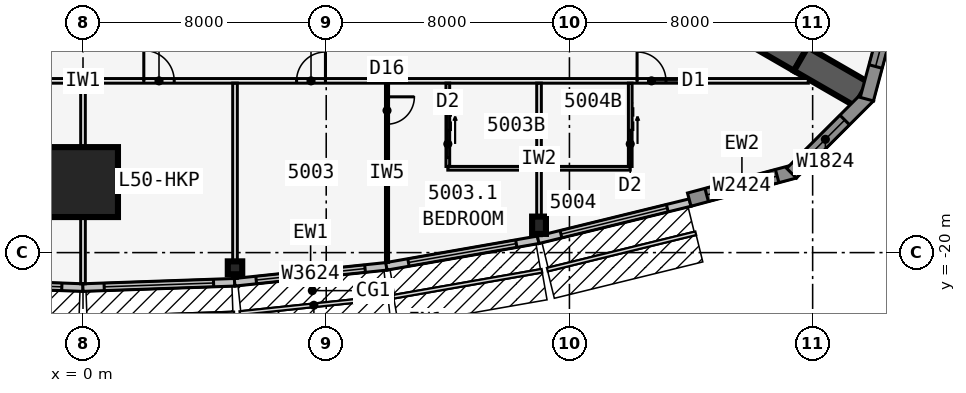
"""IFC4 building model, lengths in metres.
Left out: names, types, materials, properties, quantities, classifications, styles, units other than length and angle.
Written with IfcOpenShell. Run it as: python <this file> out.ifc"""

import sys

from ifc_helpers import new_model, si_unit, direction, frame, frame_2d, origin, origin_2d, place, context, subcontext, project, spatial, polyline, rectangle, i_section, outline, extrude, element, fill, save


model = new_model("IFC4")
c1 = context("Model", 3, precision=1e-05, world=origin(), true_north=direction((0.0, 1.0)))
c2 = subcontext(c1, "Body", "Model", "MODEL_VIEW")
j1 = project(units=[si_unit("LENGTHUNIT", "METRE"), si_unit("PLANEANGLEUNIT", "RADIAN")], contexts=[c1])
p1 = place(None, origin())
s1 = spatial("IfcSite", under=j1, at=p1, CompositionType="ELEMENT")
p2 = place(p1, origin())
s2 = spatial("IfcBuilding", under=s1, at=p2, CompositionType="ELEMENT")
p3 = place(p2, frame((0.0, 0.0, 186.1)))
s3 = spatial("IfcBuildingStorey", under=s2, at=p3, CompositionType="ELEMENT", Elevation=186.1)
for number, where, z_axis, x_axis in (
    (1, (21.61, -12.477, 0.0), (0.0, 0.0, 1.0), (0.866, -0.5, 0.0)),
    (2, (23.61, -13.631, 0.0), (0.0, 0.0, 1.0), (0.866, -0.5, 0.0)),
):
    element("IfcWall", number, at=place(p3, frame(where, z_axis=z_axis, x_axis=x_axis)), inside=s3, PredefinedType="SHEAR", context=c2, shape_type="SweptSolid", body=[
        extrude(rectangle(XDim=2.309, YDim=0.9, at=frame_2d((1.155, 0.0))), origin(), (0.0, 0.0, 1.0), 3.4),
    ])
p4 = place(p3, frame((5.0, -20.5, 0.0), z_axis=(0.0, 0.0, 1.0), x_axis=(0.0, -1.0, 0.0)))
e3 = element("IfcColumn", 3, at=p4, inside=s3, PredefinedType="COLUMN", context=c2, shape_type="SweptSolid", body=[
    extrude(i_section(OverallWidth=0.424, OverallDepth=0.475, WebThickness=0.048, FlangeThickness=0.077, at=origin_2d()), origin(), (0.0, 0.0, 1.0), 3.4),
])
p5 = place(p3, frame((15.0, -19.1, 0.0), z_axis=(0.0, 0.0, 1.0), x_axis=(1.0, 0.0, 0.0)))
e4 = element("IfcColumn", 4, at=p5, inside=s3, PredefinedType="COLUMN", context=c2, shape_type="SweptSolid", body=[
    extrude(i_section(OverallWidth=0.455, OverallDepth=0.569, WebThickness=0.078, FlangeThickness=0.125, at=origin_2d()), origin(), (0.0, 0.0, 1.0), 3.4),
])
p6 = place(p3, frame((0.0, -17.68, 0.0), z_axis=(0.0, 0.0, 1.0), x_axis=(0.0, -1.0, 0.0)))
e5 = element("IfcColumn", 5, at=p6, inside=s3, PredefinedType="COLUMN", context=c2, shape_type="SweptSolid", body=[
    extrude(rectangle(XDim=2.3, YDim=2.3, at=origin_2d()), origin(), (0.0, 0.0, 1.0), 3.4),
])
p7 = place(p3, frame((-4.996, -20.975, 0.0), z_axis=(0.0, 0.0, 1.0), x_axis=(0.999387720943, -0.034988329879, 0.0)))
e6 = element("IfcWall", 6, at=p7, inside=s3, PredefinedType="STANDARD", context=c2, shape_type="SweptSolid", body=[
    extrude(rectangle(XDim=5.003, YDim=0.25, at=frame_2d((2.501, 0.0))), origin(), (0.0, 0.0, 1.0), 3.15),
])
p8 = place(p7, frame((0.701, 0.0, 0.45)))
e7 = element("IfcOpeningElement", 7, at=p8, cuts=e6, PredefinedType="OPENING", context=c2, shape_type="SweptSolid", body=[
    extrude(rectangle(XDim=3.6, YDim=2.4, at=frame_2d((1.8, 1.2))), frame((0.0, 0.135, 0.0), z_axis=(0.0, -1.0, 0.0), x_axis=(1.0, 0.0, 0.0)), (0.0, 0.0, 1.0), 0.27),
])
p9 = place(p3, frame((-0.004, -21.15, 0.0), z_axis=(0.0, 0.0, 1.0), x_axis=(0.999387720943, 0.034988329879, 0.0)))
e8 = element("IfcWall", 8, at=p9, inside=s3, PredefinedType="STANDARD", context=c2, shape_type="SweptSolid", body=[
    extrude(rectangle(XDim=5.003, YDim=0.25, at=frame_2d((2.501, 0.0))), origin(), (0.0, 0.0, 1.0), 3.15),
])
p10 = place(p9, frame((0.701, 0.0, 0.45)))
e9 = element("IfcOpeningElement", 9, at=p10, cuts=e8, PredefinedType="OPENING", context=c2, shape_type="SweptSolid", body=[
    extrude(rectangle(XDim=3.6, YDim=2.4, at=frame_2d((1.8, 1.2))), frame((0.0, 0.135, 0.0), z_axis=(0.0, -1.0, 0.0), x_axis=(1.0, 0.0, 0.0)), (0.0, 0.0, 1.0), 0.27),
])
p11 = place(p3, frame((4.987, -20.976, 0.0), z_axis=(0.0, 0.0, 1.0), x_axis=(0.994534683851, 0.104406717299, 0.0)))
e10 = element("IfcWall", 10, at=p11, inside=s3, PredefinedType="STANDARD", context=c2, shape_type="SweptSolid", body=[
    extrude(rectangle(XDim=5.028, YDim=0.25, at=frame_2d((2.514, 0.0))), origin(), (0.0, 0.0, 1.0), 3.15),
])
p12 = place(p11, frame((0.714, 0.0, 0.45)))
e11 = element("IfcOpeningElement", 11, at=p12, cuts=e10, PredefinedType="OPENING", context=c2, shape_type="SweptSolid", body=[
    extrude(rectangle(XDim=3.6, YDim=2.4, at=frame_2d((1.8, 1.2))), frame((0.0, 0.135, 0.0), z_axis=(0.0, -1.0, 0.0), x_axis=(1.0, 0.0, 0.0)), (0.0, 0.0, 1.0), 0.27),
])
p13 = place(p3, frame((9.979, -20.452, 0.0), z_axis=(0.0, 0.0, 1.0), x_axis=(0.985030467156, 0.172380331752, 0.0)))
e12 = element("IfcWall", 12, at=p13, inside=s3, PredefinedType="STANDARD", context=c2, shape_type="SweptSolid", body=[
    extrude(rectangle(XDim=5.076, YDim=0.25, at=frame_2d((2.538, 0.0))), origin(), (0.0, 0.0, 1.0), 3.15),
])
p14 = place(p13, frame((0.738, 0.0, 0.45)))
e13 = element("IfcOpeningElement", 13, at=p14, cuts=e12, PredefinedType="OPENING", context=c2, shape_type="SweptSolid", body=[
    extrude(rectangle(XDim=3.6, YDim=2.4, at=frame_2d((1.8, 1.2))), frame((0.0, 0.135, 0.0), z_axis=(0.0, -1.0, 0.0), x_axis=(1.0, 0.0, 0.0)), (0.0, 0.0, 1.0), 0.27),
])
p15 = place(p3, frame((14.97, -19.579, 0.0), z_axis=(0.0, 0.0, 1.0), x_axis=(0.971270024053, 0.237980126011, 0.0)))
e14 = element("IfcWall", 14, at=p15, inside=s3, PredefinedType="STANDARD", context=c2, shape_type="SweptSolid", body=[
    extrude(rectangle(XDim=5.148, YDim=0.25, at=frame_2d((2.574, 0.0))), origin(), (0.0, 0.0, 1.0), 3.15),
])
p16 = place(p15, frame((0.774, 0.0, 0.45)))
e15 = element("IfcOpeningElement", 15, at=p16, cuts=e14, PredefinedType="OPENING", context=c2, shape_type="SweptSolid", body=[
    extrude(rectangle(XDim=3.6, YDim=2.4, at=frame_2d((1.8, 1.2))), frame((0.0, 0.135, 0.0), z_axis=(0.0, -1.0, 0.0), x_axis=(1.0, 0.0, 0.0)), (0.0, 0.0, 1.0), 0.27),
])
p17 = place(p3, frame((19.942, -18.258, 0.0), z_axis=(0.0, 0.0, 1.0), x_axis=(0.965924653531, 0.258823421857, 0.0)))
e16 = element("IfcWall", 16, at=p17, inside=s3, PredefinedType="SOLIDWALL", context=c2, shape_type="SweptSolid", body=[
    extrude(rectangle(XDim=3.586, YDim=0.45, at=frame_2d((1.793, 0.0))), origin(), (0.0, 0.0, 1.0), 3.15),
])
p18 = place(p17, frame((0.593, 0.0, 0.45)))
e17 = element("IfcOpeningElement", 17, at=p18, cuts=e16, PredefinedType="OPENING", context=c2, shape_type="SweptSolid", body=[
    extrude(rectangle(XDim=2.4, YDim=2.4, at=frame_2d((1.2, 1.2))), frame((0.0, 0.235, 0.0), z_axis=(0.0, -1.0, 0.0), x_axis=(1.0, 0.0, 0.0)), (0.0, 0.0, 1.0), 0.47),
])
p19 = place(p3, frame((23.305, -17.388, 0.0), z_axis=(0.0, 0.0, 1.0), x_axis=(0.707106781187, 0.707106781187, 0.0)))
e18 = element("IfcWall", 18, at=p19, inside=s3, PredefinedType="SOLIDWALL", context=c2, shape_type="SweptSolid", body=[
    extrude(outline(polyline([(3.586, 0.225), (3.527, 0.225), (3.035, 0.093), (3.0, 0.225), (0.0, 0.225), (0.0, -0.225), (3.586, -0.225), (3.586, 0.225)])), origin(), (0.0, 0.0, 1.0), 3.15),
])
p20 = place(p19, frame((0.675, 0.0, 0.45)))
e19 = element("IfcOpeningElement", 19, at=p20, cuts=e18, PredefinedType="OPENING", context=c2, shape_type="SweptSolid", body=[
    extrude(rectangle(XDim=1.8, YDim=2.4, at=frame_2d((0.9, 1.2))), frame((0.0, 0.235, 0.0), z_axis=(0.0, -1.0, 0.0), x_axis=(1.0, 0.0, 0.0)), (0.0, 0.0, 1.0), 0.47),
])
p21 = place(p3, frame((25.783, -14.953, 0.0), z_axis=(0.0, 0.0, 1.0), x_axis=(0.258823421857, 0.965924653531, 0.0)))
e20 = element("IfcWall", 20, at=p21, inside=s3, PredefinedType="SOLIDWALL", context=c2, shape_type="SweptSolid", body=[
    extrude(outline(polyline([(3.586, 0.225), (0.586, 0.225), (0.551, 0.093), (0.06, 0.225), (0.0, 0.225), (0.0, -0.225), (3.586, -0.225), (3.586, 0.225)])), origin(), (0.0, 0.0, 1.0), 3.15),
])
p22 = place(p21, frame((1.111, 0.0, 0.45)))
e21 = element("IfcOpeningElement", 21, at=p22, cuts=e20, PredefinedType="OPENING", context=c2, shape_type="SweptSolid", body=[
    extrude(rectangle(XDim=1.8, YDim=2.4, at=frame_2d((0.9, 1.2))), frame((0.0, 0.235, 0.0), z_axis=(0.0, -1.0, 0.0), x_axis=(1.0, 0.0, 0.0)), (0.0, 0.0, 1.0), 0.47),
])
p23 = place(p3, frame((-23.857, -14.351, 0.0), z_axis=(0.0, 0.0, 1.0), x_axis=(1.0, 0.0, 0.0)))
e22 = element("IfcWall", 22, at=p23, inside=s3, PredefinedType="PARTITIONING", context=c2, shape_type="SweptSolid", body=[
    extrude(rectangle(XDim=47.714, YDim=0.15, at=frame_2d((23.857, 0.0))), origin(), (0.0, 0.0, 1.0), 3.15),
])
p24 = place(p23, frame((4.123, 0.0, 0.0)))
e23 = element("IfcOpeningElement", 23, at=p24, cuts=e22, PredefinedType="OPENING", context=c2, shape_type="SweptSolid", body=[
    extrude(rectangle(XDim=0.95, YDim=2.13, at=frame_2d((0.475, 1.065))), frame((0.0, 0.085, 0.0), z_axis=(0.0, -1.0, 0.0), x_axis=(1.0, 0.0, 0.0)), (0.0, 0.0, 1.0), 0.17),
])
p25 = place(p23, frame((17.082, 0.0, 0.0)))
e24 = element("IfcOpeningElement", 24, at=p25, cuts=e22, PredefinedType="OPENING", context=c2, shape_type="SweptSolid", body=[
    extrude(rectangle(XDim=0.95, YDim=2.13, at=frame_2d((0.475, 1.065))), frame((0.0, 0.085, 0.0), z_axis=(0.0, -1.0, 0.0), x_axis=(1.0, 0.0, 0.0)), (0.0, 0.0, 1.0), 0.17),
])
p26 = place(p23, frame((25.857, 0.0, 0.0)))
e25 = element("IfcOpeningElement", 25, at=p26, cuts=e22, PredefinedType="OPENING", context=c2, shape_type="SweptSolid", body=[
    extrude(rectangle(XDim=1.0, YDim=2.13, at=frame_2d((0.5, 1.065))), frame((0.0, 0.085, 0.0), z_axis=(0.0, -1.0, 0.0), x_axis=(1.0, 0.0, 0.0)), (0.0, 0.0, 1.0), 0.17),
])
p27 = place(p23, frame((30.882, 0.0, 0.0)))
e26 = element("IfcOpeningElement", 26, at=p27, cuts=e22, PredefinedType="OPENING", context=c2, shape_type="SweptSolid", body=[
    extrude(rectangle(XDim=0.95, YDim=2.13, at=frame_2d((0.475, 1.065))), frame((0.0, 0.085, 0.0), z_axis=(0.0, -1.0, 0.0), x_axis=(1.0, 0.0, 0.0)), (0.0, 0.0, 1.0), 0.17),
])
p28 = place(p23, frame((42.082, 0.0, 0.0)))
e27 = element("IfcOpeningElement", 27, at=p28, cuts=e22, PredefinedType="OPENING", context=c2, shape_type="SweptSolid", body=[
    extrude(rectangle(XDim=0.95, YDim=2.13, at=frame_2d((0.475, 1.065))), frame((0.0, 0.085, 0.0), z_axis=(0.0, -1.0, 0.0), x_axis=(1.0, 0.0, 0.0)), (0.0, 0.0, 1.0), 0.17),
])
p29 = place(p3, frame((0.0, -14.426, 0.0), z_axis=(0.0, 0.0, 1.0), x_axis=(0.0, -1.0, 0.0)))
e28 = element("IfcWall", 28, at=p29, inside=s3, PredefinedType="PARTITIONING", context=c2, shape_type="SweptSolid", body=[
    extrude(rectangle(XDim=6.599, YDim=0.15, at=frame_2d((3.299, 0.0))), origin(), (0.0, 0.0, 1.0), 2.108),
])
p30 = place(p3, frame((5.0, -14.426, 0.0), z_axis=(0.0, 0.0, 1.0), x_axis=(0.0, -1.0, 0.0)))
e29 = element("IfcWall", 29, at=p30, inside=s3, PredefinedType="PARTITIONING", context=c2, shape_type="SweptSolid", body=[
    extrude(rectangle(XDim=6.423, YDim=0.15, at=frame_2d((3.211, 0.0))), origin(), (0.0, 0.0, 1.0), 2.05),
])
p31 = place(p3, frame((10.0, -14.426, 0.0), z_axis=(0.0, 0.0, 1.0), x_axis=(0.0, -1.0, 0.0)))
e30 = element("IfcWall", 30, at=p31, inside=s3, PredefinedType="PARTITIONING", context=c2, shape_type="SweptSolid", body=[
    extrude(rectangle(XDim=5.895, YDim=0.1, at=frame_2d((2.948, 0.0))), origin(), (0.0, 0.0, 1.0), 2.108),
])
p32 = place(p31, frame((0.45, 0.0, 0.0)))
e31 = element("IfcOpeningElement", 31, at=p32, cuts=e30, PredefinedType="OPENING", context=c2, shape_type="SweptSolid", body=[
    extrude(rectangle(XDim=0.9, YDim=2.032, at=frame_2d((0.45, 1.016))), frame((0.0, 0.06, 0.0), z_axis=(0.0, -1.0, 0.0), x_axis=(1.0, 0.0, 0.0)), (0.0, 0.0, 1.0), 0.12),
])
p33 = place(p3, frame((15.0, -14.426, 0.0), z_axis=(0.0, 0.0, 1.0), x_axis=(0.0, -1.0, 0.0)))
e32 = element("IfcWall", 32, at=p33, inside=s3, PredefinedType="PARTITIONING", context=c2, shape_type="SweptSolid", body=[
    extrude(rectangle(XDim=5.017, YDim=0.15, at=frame_2d((2.508, 0.0))), origin(), (0.0, 0.0, 1.0), 2.05),
])
p34 = place(p3, frame((12.0, -17.226, 0.0), z_axis=(0.0, 0.0, 1.0), x_axis=(1.0, 0.0, 0.0)))
e33 = element("IfcWall", 33, at=p34, inside=s3, PredefinedType="PLUMBINGWALL", context=c2, shape_type="SweptSolid", body=[
    extrude(rectangle(XDim=3.0, YDim=0.12, at=frame_2d((1.5, 0.0))), origin(), (0.0, 0.0, 1.0), 3.15),
])
p35 = place(p3, frame((12.0, -14.426, 0.0), z_axis=(0.0, 0.0, 1.0), x_axis=(0.0, -1.0, 0.0)))
e34 = element("IfcWall", 34, at=p35, inside=s3, PredefinedType="PLUMBINGWALL", context=c2, shape_type="SweptSolid", body=[
    extrude(rectangle(XDim=2.74, YDim=0.12, at=frame_2d((1.37, 0.0))), origin(), (0.0, 0.0, 1.0), 3.15),
])
p36 = place(p35, frame((1.55, 0.0, 0.0)))
e35 = element("IfcOpeningElement", 35, at=p36, cuts=e34, PredefinedType="OPENING", context=c2, shape_type="SweptSolid", body=[
    extrude(rectangle(XDim=0.9, YDim=2.13, at=frame_2d((0.45, 1.065))), frame((0.0, 0.07, 0.0), z_axis=(0.0, -1.0, 0.0), x_axis=(1.0, 0.0, 0.0)), (0.0, 0.0, 1.0), 0.14),
])
p37 = place(p3, frame((15.0, -17.226, 0.0), z_axis=(0.0, 0.0, 1.0), x_axis=(1.0, 0.0, 0.0)))
e36 = element("IfcWall", 36, at=p37, inside=s3, PredefinedType="PLUMBINGWALL", context=c2, shape_type="SweptSolid", body=[
    extrude(rectangle(XDim=3.0, YDim=0.12, at=frame_2d((1.5, 0.0))), origin(), (0.0, 0.0, 1.0), 3.15),
])
p38 = place(p3, frame((18.0, -14.426, 0.0), z_axis=(0.0, 0.0, 1.0), x_axis=(0.0, -1.0, 0.0)))
e37 = element("IfcWall", 37, at=p38, inside=s3, PredefinedType="PLUMBINGWALL", context=c2, shape_type="SweptSolid", body=[
    extrude(rectangle(XDim=2.74, YDim=0.12, at=frame_2d((1.37, 0.0))), origin(), (0.0, 0.0, 1.0), 3.15),
])
p39 = place(p38, frame((1.55, 0.0, 0.0)))
e38 = element("IfcOpeningElement", 38, at=p39, cuts=e37, PredefinedType="OPENING", context=c2, shape_type="SweptSolid", body=[
    extrude(rectangle(XDim=0.9, YDim=2.13, at=frame_2d((0.45, 1.065))), frame((0.0, 0.07, 0.0), z_axis=(0.0, -1.0, 0.0), x_axis=(1.0, 0.0, 0.0)), (0.0, 0.0, 1.0), 0.14),
])
p40 = place(p8, origin())
e39 = element("IfcWindow", 39, at=p40, inside=s3, PartitioningType="SINGLE_PANEL", PredefinedType="WINDOW", context=c2, shape_type="SweptSolid", body=[
    extrude(rectangle(XDim=3.6, YDim=2.4, at=frame_2d((1.8, 1.2))), frame((0.0, 0.03, 0.0), z_axis=(0.0, -1.0, 0.0), x_axis=(1.0, 0.0, 0.0)), (0.0, 0.0, 1.0), 0.06),
])
fill(e7, e39)
p41 = place(p10, origin())
e40 = element("IfcWindow", 40, at=p41, inside=s3, PartitioningType="SINGLE_PANEL", PredefinedType="WINDOW", context=c2, shape_type="SweptSolid", body=[
    extrude(rectangle(XDim=3.6, YDim=2.4, at=frame_2d((1.8, 1.2))), frame((0.0, 0.03, 0.0), z_axis=(0.0, -1.0, 0.0), x_axis=(1.0, 0.0, 0.0)), (0.0, 0.0, 1.0), 0.06),
])
fill(e9, e40)
p42 = place(p12, origin())
e41 = element("IfcWindow", 41, at=p42, inside=s3, PartitioningType="SINGLE_PANEL", PredefinedType="WINDOW", context=c2, shape_type="SweptSolid", body=[
    extrude(rectangle(XDim=3.6, YDim=2.4, at=frame_2d((1.8, 1.2))), frame((0.0, 0.03, 0.0), z_axis=(0.0, -1.0, 0.0), x_axis=(1.0, 0.0, 0.0)), (0.0, 0.0, 1.0), 0.06),
])
fill(e11, e41)
p43 = place(p14, origin())
e42 = element("IfcWindow", 42, at=p43, inside=s3, PartitioningType="SINGLE_PANEL", PredefinedType="WINDOW", context=c2, shape_type="SweptSolid", body=[
    extrude(rectangle(XDim=3.6, YDim=2.4, at=frame_2d((1.8, 1.2))), frame((0.0, 0.03, 0.0), z_axis=(0.0, -1.0, 0.0), x_axis=(1.0, 0.0, 0.0)), (0.0, 0.0, 1.0), 0.06),
])
fill(e13, e42)
p44 = place(p16, origin())
e43 = element("IfcWindow", 43, at=p44, inside=s3, PartitioningType="SINGLE_PANEL", PredefinedType="WINDOW", context=c2, shape_type="SweptSolid", body=[
    extrude(rectangle(XDim=3.6, YDim=2.4, at=frame_2d((1.8, 1.2))), frame((0.0, 0.03, 0.0), z_axis=(0.0, -1.0, 0.0), x_axis=(1.0, 0.0, 0.0)), (0.0, 0.0, 1.0), 0.06),
])
fill(e15, e43)
p45 = place(p18, origin())
e44 = element("IfcWindow", 44, at=p45, inside=s3, PartitioningType="SINGLE_PANEL", PredefinedType="WINDOW", context=c2, shape_type="SweptSolid", body=[
    extrude(rectangle(XDim=2.4, YDim=2.4, at=frame_2d((1.2, 1.2))), frame((0.0, 0.03, 0.0), z_axis=(0.0, -1.0, 0.0), x_axis=(1.0, 0.0, 0.0)), (0.0, 0.0, 1.0), 0.06),
])
fill(e17, e44)
p46 = place(p20, origin())
e45 = element("IfcWindow", 45, at=p46, inside=s3, PartitioningType="SINGLE_PANEL", PredefinedType="WINDOW", context=c2, shape_type="SweptSolid", body=[
    extrude(rectangle(XDim=1.8, YDim=2.4, at=frame_2d((0.9, 1.2))), frame((0.0, 0.03, 0.0), z_axis=(0.0, -1.0, 0.0), x_axis=(1.0, 0.0, 0.0)), (0.0, 0.0, 1.0), 0.06),
])
fill(e19, e45)
p47 = place(p22, origin())
e46 = element("IfcWindow", 46, at=p47, inside=s3, PartitioningType="SINGLE_PANEL", PredefinedType="WINDOW", context=c2, shape_type="SweptSolid", body=[
    extrude(rectangle(XDim=1.8, YDim=2.4, at=frame_2d((0.9, 1.2))), frame((0.0, 0.03, 0.0), z_axis=(0.0, -1.0, 0.0), x_axis=(1.0, 0.0, 0.0)), (0.0, 0.0, 1.0), 0.06),
])
fill(e21, e46)
p48 = place(p32, origin())
e47 = element("IfcDoor", 47, at=p48, inside=s3, OperationType="SINGLE_SWING_LEFT", PredefinedType="DOOR", context=c2, shape_type="SweptSolid", body=[
    extrude(rectangle(XDim=0.9, YDim=2.032, at=frame_2d((0.45, 1.016))), frame((0.0, 0.025, 0.0), z_axis=(0.0, -1.0, 0.0), x_axis=(1.0, 0.0, 0.0)), (0.0, 0.0, 1.0), 0.05),
])
fill(e31, e47)
p49 = place(p26, origin())
e48 = element("IfcDoor", 48, at=p49, inside=s3, OperationType="SINGLE_SWING_LEFT", PredefinedType="DOOR", context=c2, shape_type="SweptSolid", body=[
    extrude(rectangle(XDim=1.0, YDim=2.13, at=frame_2d((0.5, 1.065))), frame((0.0, 0.025, 0.0), z_axis=(0.0, -1.0, 0.0), x_axis=(1.0, 0.0, 0.0)), (0.0, 0.0, 1.0), 0.05),
])
fill(e25, e48)
p50 = place(p27, origin())
e49 = element("IfcDoor", 49, at=p50, inside=s3, OperationType="SINGLE_SWING_RIGHT", PredefinedType="DOOR", context=c2, shape_type="SweptSolid", body=[
    extrude(rectangle(XDim=0.95, YDim=2.13, at=frame_2d((0.475, 1.065))), frame((0.0, 0.025, 0.0), z_axis=(0.0, -1.0, 0.0), x_axis=(1.0, 0.0, 0.0)), (0.0, 0.0, 1.0), 0.05),
])
fill(e26, e49)
p51 = place(p36, origin())
e50 = element("IfcDoor", 50, at=p51, inside=s3, OperationType="SLIDING_TO_LEFT", PredefinedType="DOOR", context=c2, shape_type="SweptSolid", body=[
    extrude(rectangle(XDim=0.9, YDim=2.13, at=frame_2d((0.45, 1.065))), frame((0.0, 0.025, 0.0), z_axis=(0.0, -1.0, 0.0), x_axis=(1.0, 0.0, 0.0)), (0.0, 0.0, 1.0), 0.05),
])
fill(e35, e50)
p52 = place(p39, origin())
e51 = element("IfcDoor", 51, at=p52, inside=s3, OperationType="SLIDING_TO_LEFT", PredefinedType="DOOR", context=c2, shape_type="SweptSolid", body=[
    extrude(rectangle(XDim=0.9, YDim=2.13, at=frame_2d((0.45, 1.065))), frame((0.0, 0.025, 0.0), z_axis=(0.0, -1.0, 0.0), x_axis=(1.0, 0.0, 0.0)), (0.0, 0.0, 1.0), 0.05),
])
fill(e38, e51)
p53 = place(p28, origin())
e52 = element("IfcDoor", 52, at=p53, inside=s3, OperationType="SINGLE_SWING_LEFT", PredefinedType="DOOR", context=c2, shape_type="SweptSolid", body=[
    extrude(rectangle(XDim=0.95, YDim=2.13, at=frame_2d((0.475, 1.065))), frame((0.0, 0.025, 0.0), z_axis=(0.0, -1.0, 0.0), x_axis=(1.0, 0.0, 0.0)), (0.0, 0.0, 1.0), 0.05),
])
fill(e27, e52)
save(model, sys.argv[1])
